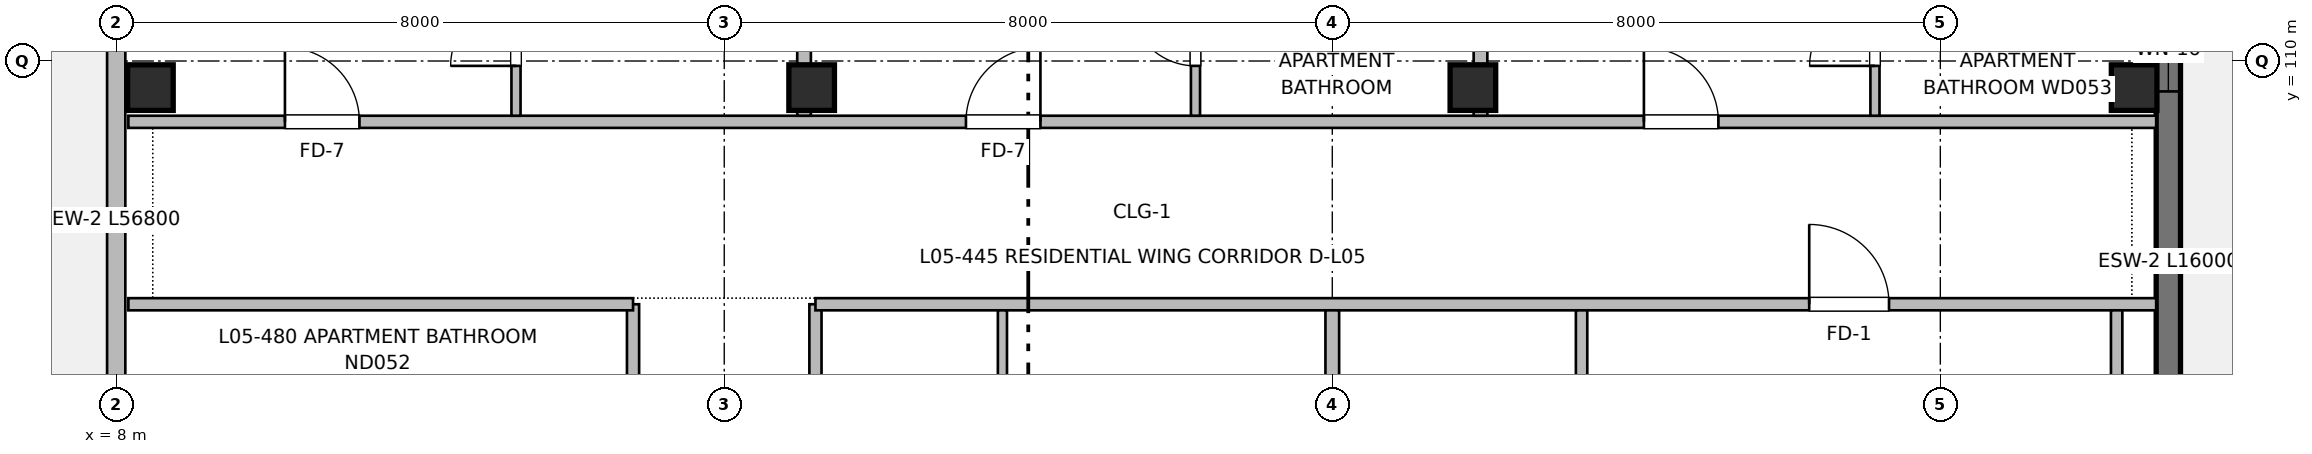
"""IFC4 building model, lengths in metres.
Left out: names, types, materials, properties, quantities, classifications, styles, units other than length and angle.
Written with IfcOpenShell. Run it as: python <this file> out.ifc"""

import sys

from ifc_helpers import new_model, si_unit, direction, frame, frame_2d, origin, origin_2d, place, context, subcontext, project, spatial, rectangle, extrude, element, fill, save


model = new_model("IFC4")
c1 = context("Model", 3, precision=1e-05, world=origin(), true_north=direction((0.0, 1.0)))
c2 = subcontext(c1, "Body", "Model", "MODEL_VIEW")
j1 = project(units=[si_unit("LENGTHUNIT", "METRE"), si_unit("PLANEANGLEUNIT", "RADIAN")], contexts=[c1])
p1 = place(None, origin())
s1 = spatial("IfcSite", under=j1, at=p1, CompositionType="ELEMENT")
p2 = place(p1, origin())
s2 = spatial("IfcBuilding", under=s1, at=p2, CompositionType="ELEMENT")
p3 = place(p2, frame((0.0, 0.0, 16.96)))
s3 = spatial("IfcBuildingStorey", under=s2, at=p3, CompositionType="ELEMENT", Elevation=16.96)
for number, where, z_axis, x_axis in (
    (1, (8.45, 109.65, 0.0), (0.0, 0.0, 1.0), (1.0, 0.0, 0.0)),
    (2, (17.15, 109.65, 0.0), (0.0, 0.0, 1.0), (1.0, 0.0, 0.0)),
    (3, (25.85, 109.65, 0.0), (0.0, 0.0, 1.0), (1.0, 0.0, 0.0)),
    (4, (34.55, 109.65, 0.0), (0.0, 0.0, 1.0), (1.0, 0.0, 0.0)),
):
    element("IfcColumn", number, at=place(p3, frame(where, z_axis=z_axis, x_axis=x_axis)), inside=s3, PredefinedType="COLUMN", context=c2, shape_type="SweptSolid", body=[
        extrude(rectangle(XDim=0.6, YDim=0.6, at=origin_2d()), origin(), (0.0, 0.0, 1.0), 3.2),
    ])
p4 = place(p3, frame((35.0, 116.0, 0.0), z_axis=(0.0, 0.0, 1.0), x_axis=(0.0, -1.0, 0.0)))
e5 = element("IfcWall", 5, at=p4, inside=s3, PredefinedType="SHEAR", context=c2, shape_type="SweptSolid", body=[
    extrude(rectangle(XDim=16.0, YDim=0.32, at=frame_2d((8.0, 0.0))), origin(), (0.0, 0.0, 1.0), 2.98),
])
p5 = place(p4, frame((2.95, 0.0, 0.0)))
e6 = element("IfcOpeningElement", 6, at=p5, cuts=e5, PredefinedType="OPENING", context=c2, shape_type="SweptSolid", body=[
    extrude(rectangle(XDim=1.2, YDim=2.2, at=frame_2d((0.6, 1.1))), frame((0.0, 0.17, 0.0), z_axis=(0.0, -1.0, 0.0), x_axis=(1.0, 0.0, 0.0)), (0.0, 0.0, 1.0), 0.34),
])
p6 = place(p4, frame((5.3, 0.0, 0.62)))
e7 = element("IfcOpeningElement", 7, at=p6, cuts=e5, PredefinedType="OPENING", context=c2, shape_type="SweptSolid", body=[
    extrude(rectangle(XDim=1.1, YDim=1.6, at=frame_2d((0.55, 0.8))), frame((0.0, 0.17, 0.0), z_axis=(0.0, -1.0, 0.0), x_axis=(1.0, 0.0, 0.0)), (0.0, 0.0, 1.0), 0.34),
])
p7 = place(p4, frame((10.875, 0.0, 0.72)))
e8 = element("IfcOpeningElement", 8, at=p7, cuts=e5, PredefinedType="OPENING", context=c2, shape_type="SweptSolid", body=[
    extrude(rectangle(XDim=2.25, YDim=1.5, at=frame_2d((1.125, 0.75))), frame((0.0, 0.17, 0.0), z_axis=(0.0, -1.0, 0.0), x_axis=(1.0, 0.0, 0.0)), (0.0, 0.0, 1.0), 0.34),
])
p8 = place(p3, frame((8.0, 59.2, 0.0), z_axis=(0.0, 0.0, 1.0), x_axis=(0.0, 1.0, 0.0)))
e9 = element("IfcWall", 9, at=p8, inside=s3, PredefinedType="SOLIDWALL", context=c2, shape_type="SweptSolid", body=[
    extrude(rectangle(XDim=56.8, YDim=0.24, at=frame_2d((28.4, 0.0))), origin(), (0.0, 0.0, 1.0), 2.98),
])
p9 = place(p8, frame((2.657, 0.0, 0.0)))
e10 = element("IfcOpeningElement", 10, at=p9, cuts=e9, PredefinedType="OPENING", context=c2, shape_type="SweptSolid", body=[
    extrude(rectangle(XDim=1.2, YDim=2.2, at=frame_2d((0.6, 1.1))), frame((0.0, 0.13, 0.0), z_axis=(0.0, -1.0, 0.0), x_axis=(1.0, 0.0, 0.0)), (0.0, 0.0, 1.0), 0.26),
])
p10 = place(p8, frame((5.357, 0.0, 0.62)))
e11 = element("IfcOpeningElement", 11, at=p10, cuts=e9, PredefinedType="OPENING", context=c2, shape_type="SweptSolid", body=[
    extrude(rectangle(XDim=1.1, YDim=1.6, at=frame_2d((0.55, 0.8))), frame((0.0, 0.13, 0.0), z_axis=(0.0, -1.0, 0.0), x_axis=(1.0, 0.0, 0.0)), (0.0, 0.0, 1.0), 0.26),
])
p11 = place(p8, frame((11.046, 0.0, 0.72)))
e12 = element("IfcOpeningElement", 12, at=p11, cuts=e9, PredefinedType="OPENING", context=c2, shape_type="SweptSolid", body=[
    extrude(rectangle(XDim=2.25, YDim=1.5, at=frame_2d((1.125, 0.75))), frame((0.0, 0.13, 0.0), z_axis=(0.0, -1.0, 0.0), x_axis=(1.0, 0.0, 0.0)), (0.0, 0.0, 1.0), 0.26),
])
p12 = place(p8, frame((19.311, 0.0, 0.9)))
e13 = element("IfcOpeningElement", 13, at=p12, cuts=e9, PredefinedType="OPENING", context=c2, shape_type="SweptSolid", body=[
    extrude(rectangle(XDim=1.05, YDim=1.15, at=frame_2d((0.525, 0.575))), frame((0.0, 0.13, 0.0), z_axis=(0.0, -1.0, 0.0), x_axis=(1.0, 0.0, 0.0)), (0.0, 0.0, 1.0), 0.26),
])
p13 = place(p8, frame((27.8, 0.0, 0.9)))
e14 = element("IfcOpeningElement", 14, at=p13, cuts=e9, PredefinedType="OPENING", context=c2, shape_type="SweptSolid", body=[
    extrude(rectangle(XDim=1.2, YDim=1.05, at=frame_2d((0.6, 0.525))), frame((0.0, 0.13, 0.0), z_axis=(0.0, -1.0, 0.0), x_axis=(1.0, 0.0, 0.0)), (0.0, 0.0, 1.0), 0.26),
])
p14 = place(p8, frame((36.189, 0.0, 0.9)))
e15 = element("IfcOpeningElement", 15, at=p14, cuts=e9, PredefinedType="OPENING", context=c2, shape_type="SweptSolid", body=[
    extrude(rectangle(XDim=0.65, YDim=0.95, at=frame_2d((0.325, 0.475))), frame((0.0, 0.13, 0.0), z_axis=(0.0, -1.0, 0.0), x_axis=(1.0, 0.0, 0.0)), (0.0, 0.0, 1.0), 0.26),
])
p15 = place(p8, frame((43.629, 0.0, 0.62)))
e16 = element("IfcOpeningElement", 16, at=p15, cuts=e9, PredefinedType="OPENING", context=c2, shape_type="SweptSolid", body=[
    extrude(rectangle(XDim=1.1, YDim=1.6, at=frame_2d((0.55, 0.8))), frame((0.0, 0.13, 0.0), z_axis=(0.0, -1.0, 0.0), x_axis=(1.0, 0.0, 0.0)), (0.0, 0.0, 1.0), 0.26),
])
p16 = place(p8, frame((52.693, 0.0, 0.47)))
e17 = element("IfcOpeningElement", 17, at=p16, cuts=e9, PredefinedType="OPENING", context=c2, shape_type="SweptSolid", body=[
    extrude(rectangle(XDim=2.7, YDim=1.75, at=frame_2d((1.35, 0.875))), frame((0.0, 0.13, 0.0), z_axis=(0.0, -1.0, 0.0), x_axis=(1.0, 0.0, 0.0)), (0.0, 0.0, 1.0), 0.26),
])
p17 = place(p3, frame((14.8, 59.36, 0.0), z_axis=(0.0, 0.0, 1.0), x_axis=(0.0, 1.0, 0.0)))
e18 = element("IfcWall", 18, at=p17, inside=s3, PredefinedType="PARTITIONING", context=c2, shape_type="SweptSolid", body=[
    extrude(rectangle(XDim=47.44, YDim=0.16, at=frame_2d((23.72, 0.0))), origin(), (0.0, 0.0, 1.0), 2.935),
])
p18 = place(p17, frame((9.64, 0.0, 0.0)))
e19 = element("IfcOpeningElement", 19, at=p18, cuts=e18, PredefinedType="OPENING", context=c2, shape_type="SweptSolid", body=[
    extrude(rectangle(XDim=1.1, YDim=2.15, at=frame_2d((0.55, 1.075))), frame((0.0, 0.09, 0.0), z_axis=(0.0, -1.0, 0.0), x_axis=(1.0, 0.0, 0.0)), (0.0, 0.0, 1.0), 0.18),
])
p19 = place(p17, frame((16.04, 0.0, 0.0)))
e20 = element("IfcOpeningElement", 20, at=p19, cuts=e18, PredefinedType="OPENING", context=c2, shape_type="SweptSolid", body=[
    extrude(rectangle(XDim=1.6, YDim=2.15, at=frame_2d((0.8, 1.075))), frame((0.0, 0.09, 0.0), z_axis=(0.0, -1.0, 0.0), x_axis=(1.0, 0.0, 0.0)), (0.0, 0.0, 1.0), 0.18),
])
p20 = place(p17, frame((1.8, 0.0, 0.0)))
e21 = element("IfcOpeningElement", 21, at=p20, cuts=e18, PredefinedType="OPENING", context=c2, shape_type="SweptSolid", body=[
    extrude(rectangle(XDim=0.96, YDim=2.15, at=frame_2d((0.48, 1.075))), frame((0.0, 0.09, 0.0), z_axis=(0.0, -1.0, 0.0), x_axis=(1.0, 0.0, 0.0)), (0.0, 0.0, 1.0), 0.18),
])
p21 = place(p17, frame((29.445, 0.0, 0.0)))
e22 = element("IfcOpeningElement", 22, at=p21, cuts=e18, PredefinedType="OPENING", context=c2, shape_type="SweptSolid", body=[
    extrude(rectangle(XDim=0.98, YDim=2.15, at=frame_2d((0.49, 1.075))), frame((0.0, 0.09, 0.0), z_axis=(0.0, -1.0, 0.0), x_axis=(1.0, 0.0, 0.0)), (0.0, 0.0, 1.0), 0.18),
])
p22 = place(p17, frame((38.055, 0.0, 0.0)))
e23 = element("IfcOpeningElement", 23, at=p22, cuts=e18, PredefinedType="OPENING", context=c2, shape_type="SweptSolid", body=[
    extrude(rectangle(XDim=0.98, YDim=2.15, at=frame_2d((0.49, 1.075))), frame((0.0, 0.09, 0.0), z_axis=(0.0, -1.0, 0.0), x_axis=(1.0, 0.0, 0.0)), (0.0, 0.0, 1.0), 0.18),
])
p23 = place(p3, frame((17.2, 59.36, 0.0), z_axis=(0.0, 0.0, 1.0), x_axis=(0.0, 1.0, 0.0)))
e24 = element("IfcWall", 24, at=p23, inside=s3, PredefinedType="PARTITIONING", context=c2, shape_type="SweptSolid", body=[
    extrude(rectangle(XDim=47.44, YDim=0.16, at=frame_2d((23.72, 0.0))), origin(), (0.0, 0.0, 1.0), 2.935),
])
p24 = place(p23, frame((8.11, 0.0, 0.0)))
e25 = element("IfcOpeningElement", 25, at=p24, cuts=e24, PredefinedType="OPENING", context=c2, shape_type="SweptSolid", body=[
    extrude(rectangle(XDim=0.98, YDim=2.15, at=frame_2d((0.49, 1.075))), frame((0.0, 0.09, 0.0), z_axis=(0.0, -1.0, 0.0), x_axis=(1.0, 0.0, 0.0)), (0.0, 0.0, 1.0), 0.18),
])
p25 = place(p23, frame((24.26, 0.0, 0.0)))
e26 = element("IfcOpeningElement", 26, at=p25, cuts=e24, PredefinedType="OPENING", context=c2, shape_type="SweptSolid", body=[
    extrude(rectangle(XDim=1.02, YDim=2.15, at=frame_2d((0.51, 1.075))), frame((0.0, 0.09, 0.0), z_axis=(0.0, -1.0, 0.0), x_axis=(1.0, 0.0, 0.0)), (0.0, 0.0, 1.0), 0.18),
])
p26 = place(p23, frame((39.97, 0.0, 0.0)))
e27 = element("IfcOpeningElement", 27, at=p26, cuts=e24, PredefinedType="OPENING", context=c2, shape_type="SweptSolid", body=[
    extrude(rectangle(XDim=0.98, YDim=2.15, at=frame_2d((0.49, 1.075))), frame((0.0, 0.09, 0.0), z_axis=(0.0, -1.0, 0.0), x_axis=(1.0, 0.0, 0.0)), (0.0, 0.0, 1.0), 0.18),
])
p27 = place(p3, frame((8.16, 106.8, 0.0), z_axis=(0.0, 0.0, 1.0), x_axis=(1.0, 0.0, 0.0)))
e28 = element("IfcWall", 28, at=p27, inside=s3, PredefinedType="PARTITIONING", context=c2, shape_type="SweptSolid", body=[
    extrude(rectangle(XDim=6.64, YDim=0.16, at=frame_2d((3.32, 0.0))), origin(), (0.0, 0.0, 1.0), 2.935),
])
p28 = place(p3, frame((17.2, 106.8, 0.0), z_axis=(0.0, 0.0, 1.0), x_axis=(1.0, 0.0, 0.0)))
e29 = element("IfcWall", 29, at=p28, inside=s3, PredefinedType="PARTITIONING", context=c2, shape_type="SweptSolid", body=[
    extrude(rectangle(XDim=17.64, YDim=0.16, at=frame_2d((8.82, 0.0))), origin(), (0.0, 0.0, 1.0), 2.935),
])
p29 = place(p28, frame((13.075, 0.0, 0.0)))
e30 = element("IfcOpeningElement", 30, at=p29, cuts=e29, PredefinedType="OPENING", context=c2, shape_type="SweptSolid", body=[
    extrude(rectangle(XDim=1.05, YDim=2.15, at=frame_2d((0.525, 1.075))), frame((0.0, 0.09, 0.0), z_axis=(0.0, -1.0, 0.0), x_axis=(1.0, 0.0, 0.0)), (0.0, 0.0, 1.0), 0.18),
])
p30 = place(p3, frame((8.16, 109.2, 0.0), z_axis=(0.0, 0.0, 1.0), x_axis=(1.0, 0.0, 0.0)))
e31 = element("IfcWall", 31, at=p30, inside=s3, PredefinedType="PARTITIONING", context=c2, shape_type="SweptSolid", body=[
    extrude(rectangle(XDim=26.68, YDim=0.16, at=frame_2d((13.34, 0.0))), origin(), (0.0, 0.0, 1.0), 2.935),
])
p31 = place(p30, frame((2.06, 0.0, 0.0)))
e32 = element("IfcOpeningElement", 32, at=p31, cuts=e31, PredefinedType="OPENING", context=c2, shape_type="SweptSolid", body=[
    extrude(rectangle(XDim=0.98, YDim=2.15, at=frame_2d((0.49, 1.075))), frame((0.0, 0.09, 0.0), z_axis=(0.0, -1.0, 0.0), x_axis=(1.0, 0.0, 0.0)), (0.0, 0.0, 1.0), 0.18),
])
p32 = place(p30, frame((11.02, 0.0, 0.0)))
e33 = element("IfcOpeningElement", 33, at=p32, cuts=e31, PredefinedType="OPENING", context=c2, shape_type="SweptSolid", body=[
    extrude(rectangle(XDim=0.98, YDim=2.15, at=frame_2d((0.49, 1.075))), frame((0.0, 0.09, 0.0), z_axis=(0.0, -1.0, 0.0), x_axis=(1.0, 0.0, 0.0)), (0.0, 0.0, 1.0), 0.18),
])
p33 = place(p30, frame((19.94, 0.0, 0.0)))
e34 = element("IfcOpeningElement", 34, at=p33, cuts=e31, PredefinedType="OPENING", context=c2, shape_type="SweptSolid", body=[
    extrude(rectangle(XDim=0.98, YDim=2.15, at=frame_2d((0.49, 1.075))), frame((0.0, 0.09, 0.0), z_axis=(0.0, -1.0, 0.0), x_axis=(1.0, 0.0, 0.0)), (0.0, 0.0, 1.0), 0.18),
])
p34 = place(p3, frame((24.0, 100.05, 0.0), z_axis=(0.0, 0.0, 1.0), x_axis=(0.0, 1.0, 0.0)))
e35 = element("IfcWall", 35, at=p34, inside=s3, PredefinedType="PARTITIONING", context=c2, shape_type="SweptSolid", body=[
    extrude(rectangle(XDim=6.67, YDim=0.18, at=frame_2d((3.335, 0.0))), origin(), (0.0, 0.0, 1.0), 2.935),
])
for number, where, z_axis, x_axis in (
    (36, (27.28, 103.99, 0.0), (0.0, 0.0, 1.0), (0.0, 1.0, 0.0)),
    (37, (34.32, 103.99, 0.0), (0.0, 0.0, 1.0), (0.0, 1.0, 0.0)),
):
    element("IfcWall", number, at=place(p3, frame(where, z_axis=z_axis, x_axis=x_axis)), inside=s3, PredefinedType="PARTITIONING", context=c2, shape_type="SweptSolid", body=[
        extrude(rectangle(XDim=2.73, YDim=0.15, at=frame_2d((1.365, 0.0))), origin(), (0.0, 0.0, 1.0), 2.935),
    ])
p35 = place(p3, frame((19.66, 91.65, 0.0), z_axis=(0.0, 0.0, 1.0), x_axis=(0.0, 1.0, 0.0)))
e38 = element("IfcWall", 38, at=p35, inside=s3, PredefinedType="PARTITIONING", context=c2, shape_type="SweptSolid", body=[
    extrude(rectangle(XDim=15.07, YDim=0.12, at=frame_2d((7.535, 0.0))), origin(), (0.0, 0.0, 1.0), 2.935),
])
p36 = place(p35, frame((2.633, 0.0, 0.0)))
e39 = element("IfcOpeningElement", 39, at=p36, cuts=e38, PredefinedType="OPENING", context=c2, shape_type="SweptSolid", body=[
    extrude(rectangle(XDim=0.86, YDim=2.1, at=frame_2d((0.43, 1.05))), frame((0.0, 0.07, 0.0), z_axis=(0.0, -1.0, 0.0), x_axis=(1.0, 0.0, 0.0)), (0.0, 0.0, 1.0), 0.14),
])
p37 = place(p35, frame((9.209, 0.0, 0.0)))
e40 = element("IfcOpeningElement", 40, at=p37, cuts=e38, PredefinedType="OPENING", context=c2, shape_type="SweptSolid", body=[
    extrude(rectangle(XDim=0.92, YDim=2.1, at=frame_2d((0.46, 1.05))), frame((0.0, 0.07, 0.0), z_axis=(0.0, -1.0, 0.0), x_axis=(1.0, 0.0, 0.0)), (0.0, 0.0, 1.0), 0.14),
])
for number, where, z_axis, x_axis in (
    (41, (17.05, 109.28, 0.0), (0.0, 0.0, 1.0), (0.0, 1.0, 0.0)),
    (42, (25.95, 109.28, 0.0), (0.0, 0.0, 1.0), (0.0, 1.0, 0.0)),
):
    element("IfcWall", number, at=place(p3, frame(where, z_axis=z_axis, x_axis=x_axis)), inside=s3, PredefinedType="PARTITIONING", context=c2, shape_type="SweptSolid", body=[
        extrude(rectangle(XDim=6.6, YDim=0.18, at=frame_2d((3.3, 0.0))), origin(), (0.0, 0.0, 1.0), 2.68),
    ])
p38 = place(p3, frame((13.26, 109.28, 0.0), z_axis=(0.0, 0.0, 1.0), x_axis=(0.0, 1.0, 0.0)))
e43 = element("IfcWall", 43, at=p38, inside=s3, PredefinedType="PARTITIONING", context=c2, shape_type="SweptSolid", body=[
    extrude(rectangle(XDim=6.6, YDim=0.12, at=frame_2d((3.3, 0.0))), origin(), (0.0, 0.0, 1.0), 2.935),
])
p39 = place(p38, frame((0.656, 0.0, 0.0)))
e44 = element("IfcOpeningElement", 44, at=p39, cuts=e43, PredefinedType="OPENING", context=c2, shape_type="SweptSolid", body=[
    extrude(rectangle(XDim=0.86, YDim=2.1, at=frame_2d((0.43, 1.05))), frame((0.0, 0.07, 0.0), z_axis=(0.0, -1.0, 0.0), x_axis=(1.0, 0.0, 0.0)), (0.0, 0.0, 1.0), 0.14),
])
p40 = place(p38, frame((4.097, 0.0, 0.0)))
e45 = element("IfcOpeningElement", 45, at=p40, cuts=e43, PredefinedType="OPENING", context=c2, shape_type="SweptSolid", body=[
    extrude(rectangle(XDim=0.9, YDim=2.1, at=frame_2d((0.45, 1.05))), frame((0.0, 0.07, 0.0), z_axis=(0.0, -1.0, 0.0), x_axis=(1.0, 0.0, 0.0)), (0.0, 0.0, 1.0), 0.14),
])
p41 = place(p3, frame((22.2, 109.28, 0.0), z_axis=(0.0, 0.0, 1.0), x_axis=(0.0, 1.0, 0.0)))
e46 = element("IfcWall", 46, at=p41, inside=s3, PredefinedType="PARTITIONING", context=c2, shape_type="SweptSolid", body=[
    extrude(rectangle(XDim=6.6, YDim=0.12, at=frame_2d((3.3, 0.0))), origin(), (0.0, 0.0, 1.0), 2.935),
])
p42 = place(p41, frame((0.656, 0.0, 0.0)))
e47 = element("IfcOpeningElement", 47, at=p42, cuts=e46, PredefinedType="OPENING", context=c2, shape_type="SweptSolid", body=[
    extrude(rectangle(XDim=0.86, YDim=2.1, at=frame_2d((0.43, 1.05))), frame((0.0, 0.07, 0.0), z_axis=(0.0, -1.0, 0.0), x_axis=(1.0, 0.0, 0.0)), (0.0, 0.0, 1.0), 0.14),
])
p43 = place(p41, frame((4.097, 0.0, 0.0)))
e48 = element("IfcOpeningElement", 48, at=p43, cuts=e46, PredefinedType="OPENING", context=c2, shape_type="SweptSolid", body=[
    extrude(rectangle(XDim=0.9, YDim=2.1, at=frame_2d((0.45, 1.05))), frame((0.0, 0.07, 0.0), z_axis=(0.0, -1.0, 0.0), x_axis=(1.0, 0.0, 0.0)), (0.0, 0.0, 1.0), 0.14),
])
p44 = place(p3, frame((31.14, 109.28, 0.0), z_axis=(0.0, 0.0, 1.0), x_axis=(0.0, 1.0, 0.0)))
e49 = element("IfcWall", 49, at=p44, inside=s3, PredefinedType="PARTITIONING", context=c2, shape_type="SweptSolid", body=[
    extrude(rectangle(XDim=6.6, YDim=0.12, at=frame_2d((3.3, 0.0))), origin(), (0.0, 0.0, 1.0), 2.935),
])
p45 = place(p44, frame((0.656, 0.0, 0.0)))
e50 = element("IfcOpeningElement", 50, at=p45, cuts=e49, PredefinedType="OPENING", context=c2, shape_type="SweptSolid", body=[
    extrude(rectangle(XDim=0.86, YDim=2.1, at=frame_2d((0.43, 1.05))), frame((0.0, 0.07, 0.0), z_axis=(0.0, -1.0, 0.0), x_axis=(1.0, 0.0, 0.0)), (0.0, 0.0, 1.0), 0.14),
])
p46 = place(p44, frame((4.097, 0.0, 0.0)))
e51 = element("IfcOpeningElement", 51, at=p46, cuts=e49, PredefinedType="OPENING", context=c2, shape_type="SweptSolid", body=[
    extrude(rectangle(XDim=0.9, YDim=2.1, at=frame_2d((0.45, 1.05))), frame((0.0, 0.07, 0.0), z_axis=(0.0, -1.0, 0.0), x_axis=(1.0, 0.0, 0.0)), (0.0, 0.0, 1.0), 0.14),
])
p47 = place(p6, origin())
e52 = element("IfcWindow", 52, at=p47, inside=s3, PartitioningType="SINGLE_PANEL", PredefinedType="WINDOW", context=c2, shape_type="SweptSolid", body=[
    extrude(rectangle(XDim=1.1, YDim=1.6, at=frame_2d((0.55, 0.8))), frame((0.0, 0.03, 0.0), z_axis=(0.0, -1.0, 0.0), x_axis=(1.0, 0.0, 0.0)), (0.0, 0.0, 1.0), 0.06),
])
fill(e7, e52)
p48 = place(p29, origin())
e53 = element("IfcDoor", 53, at=p48, inside=s3, OperationType="SINGLE_SWING_LEFT", PredefinedType="DOOR", context=c2, shape_type="SweptSolid", body=[
    extrude(rectangle(XDim=1.05, YDim=2.15, at=frame_2d((0.525, 1.075))), frame((0.0, 0.025, 0.0), z_axis=(0.0, -1.0, 0.0), x_axis=(1.0, 0.0, 0.0)), (0.0, 0.0, 1.0), 0.05),
])
fill(e30, e53)
p49 = place(p31, origin())
e54 = element("IfcDoor", 54, at=p49, inside=s3, OperationType="SINGLE_SWING_LEFT", PredefinedType="DOOR", context=c2, shape_type="SweptSolid", body=[
    extrude(rectangle(XDim=0.98, YDim=2.15, at=frame_2d((0.49, 1.075))), frame((0.0, 0.025, 0.0), z_axis=(0.0, -1.0, 0.0), x_axis=(1.0, 0.0, 0.0)), (0.0, 0.0, 1.0), 0.05),
])
fill(e32, e54)
p50 = place(p39, origin())
e55 = element("IfcDoor", 55, at=p50, inside=s3, OperationType="SINGLE_SWING_LEFT", PredefinedType="DOOR", context=c2, shape_type="SweptSolid", body=[
    extrude(rectangle(XDim=0.86, YDim=2.1, at=frame_2d((0.43, 1.05))), frame((0.0, 0.025, 0.0), z_axis=(0.0, -1.0, 0.0), x_axis=(1.0, 0.0, 0.0)), (0.0, 0.0, 1.0), 0.05),
])
fill(e44, e55)
p51 = place(p32, origin())
e56 = element("IfcDoor", 56, at=p51, inside=s3, OperationType="SINGLE_SWING_RIGHT", PredefinedType="DOOR", context=c2, shape_type="SweptSolid", body=[
    extrude(rectangle(XDim=0.98, YDim=2.15, at=frame_2d((0.49, 1.075))), frame((0.0, 0.025, 0.0), z_axis=(0.0, -1.0, 0.0), x_axis=(1.0, 0.0, 0.0)), (0.0, 0.0, 1.0), 0.05),
])
fill(e33, e56)
p52 = place(p42, origin())
e57 = element("IfcDoor", 57, at=p52, inside=s3, OperationType="SINGLE_SWING_RIGHT", PredefinedType="DOOR", context=c2, shape_type="SweptSolid", body=[
    extrude(rectangle(XDim=0.86, YDim=2.1, at=frame_2d((0.43, 1.05))), frame((0.0, 0.025, 0.0), z_axis=(0.0, -1.0, 0.0), x_axis=(1.0, 0.0, 0.0)), (0.0, 0.0, 1.0), 0.05),
])
fill(e47, e57)
p53 = place(p33, origin())
e58 = element("IfcDoor", 58, at=p53, inside=s3, OperationType="SINGLE_SWING_LEFT", PredefinedType="DOOR", context=c2, shape_type="SweptSolid", body=[
    extrude(rectangle(XDim=0.98, YDim=2.15, at=frame_2d((0.49, 1.075))), frame((0.0, 0.025, 0.0), z_axis=(0.0, -1.0, 0.0), x_axis=(1.0, 0.0, 0.0)), (0.0, 0.0, 1.0), 0.05),
])
fill(e34, e58)
p54 = place(p45, origin())
e59 = element("IfcDoor", 59, at=p54, inside=s3, OperationType="SINGLE_SWING_LEFT", PredefinedType="DOOR", context=c2, shape_type="SweptSolid", body=[
    extrude(rectangle(XDim=0.86, YDim=2.1, at=frame_2d((0.43, 1.05))), frame((0.0, 0.025, 0.0), z_axis=(0.0, -1.0, 0.0), x_axis=(1.0, 0.0, 0.0)), (0.0, 0.0, 1.0), 0.05),
])
fill(e50, e59)
save(model, sys.argv[1])
